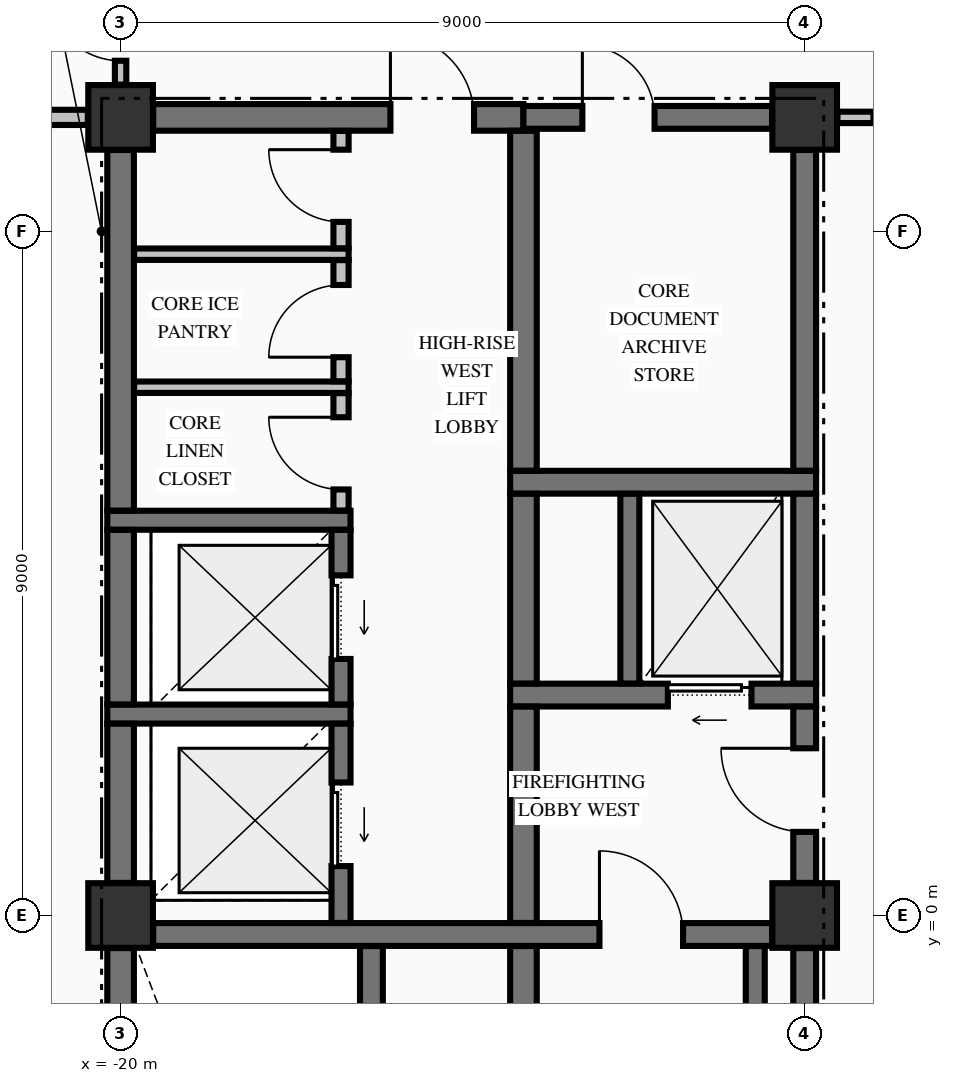
"""IFC4 building model, lengths in metres.
Left out: names, types, materials, properties, quantities, classifications, styles, units other than length and angle.
Written with IfcOpenShell. Run it as: python <this file> out.ifc"""

import sys

from ifc_helpers import new_model, si_unit, direction, frame, frame_2d, origin, origin_2d, place, context, subcontext, project, spatial, rectangle, extrude, element, fill, save


model = new_model("IFC4")
c1 = context("Model", 3, precision=1e-05, world=origin(), true_north=direction((0.0, 1.0)))
c2 = subcontext(c1, "Body", "Model", "MODEL_VIEW")
j1 = project(units=[si_unit("LENGTHUNIT", "METRE"), si_unit("PLANEANGLEUNIT", "RADIAN")], contexts=[c1])
p1 = place(None, origin())
s1 = spatial("IfcSite", under=j1, at=p1, CompositionType="ELEMENT")
p2 = place(p1, origin())
s2 = spatial("IfcBuilding", under=s1, at=p2, CompositionType="ELEMENT")
p3 = place(p2, frame((0.0, 0.0, 201.66)))
s3 = spatial("IfcBuildingStorey", under=s2, at=p3, CompositionType="ELEMENT", Elevation=201.66)
for number, where, z_axis, x_axis in (
    (1, (-20.0, 10.5, -0.25), (0.0, 0.0, 1.0), (1.0, 0.0, 0.0)),
    (2, (-11.0, 0.0, -0.25), (0.0, 0.0, 1.0), (1.0, 0.0, 0.0)),
    (3, (-11.0, 10.5, -0.25), (0.0, 0.0, 1.0), (1.0, 0.0, 0.0)),
    (4, (-20.0, 0.0, -0.25), (0.0, 0.0, 1.0), (1.0, 0.0, 0.0)),
):
    element("IfcColumn", number, at=place(p3, frame(where, z_axis=z_axis, x_axis=x_axis)), inside=s3, PredefinedType="COLUMN", context=c2, shape_type="SweptSolid", body=[
        extrude(rectangle(XDim=0.85, YDim=0.85, at=origin_2d()), origin(), (0.0, 0.0, 1.0), 3.4),
    ])
p4 = place(p3, frame((-19.571, -0.25, 0.0), z_axis=(0.0, 0.0, 1.0), x_axis=(1.0, 0.0, 0.0)))
e5 = element("IfcWall", 5, at=p4, inside=s3, PredefinedType="SHEAR", context=c2, shape_type="SweptSolid", body=[
    extrude(rectangle(XDim=8.142, YDim=0.3, at=frame_2d((4.071, 0.0))), origin(), (0.0, 0.0, 1.0), 3.15),
])
p5 = place(p4, frame((5.871, 0.0, 0.0)))
e6 = element("IfcOpeningElement", 6, at=p5, cuts=e5, PredefinedType="OPENING", context=c2, shape_type="SweptSolid", body=[
    extrude(rectangle(XDim=1.1, YDim=2.15, at=frame_2d((0.55, 1.075))), frame((0.0, 0.16, 0.0), z_axis=(0.0, -1.0, 0.0), x_axis=(1.0, 0.0, 0.0)), (0.0, 0.0, 1.0), 0.32),
])
p6 = place(p3, frame((-20.175, 2.65, 0.0), z_axis=(0.0, 0.0, 1.0), x_axis=(1.0, 0.0, 0.0)))
e7 = element("IfcWall", 7, at=p6, inside=s3, PredefinedType="SOLIDWALL", context=c2, shape_type="SweptSolid", body=[
    extrude(rectangle(XDim=3.2, YDim=0.25, at=frame_2d((1.6, 0.0))), origin(), (0.0, 0.0, 1.0), 3.15),
])
p7 = place(p3, frame((-14.875, 2.9, 0.0), z_axis=(0.0, 0.0, 1.0), x_axis=(1.0, 0.0, 0.0)))
e8 = element("IfcWall", 8, at=p7, inside=s3, PredefinedType="SHEAR", context=c2, shape_type="SweptSolid", body=[
    extrude(rectangle(XDim=4.025, YDim=0.3, at=frame_2d((2.012, 0.0))), origin(), (0.0, 0.0, 1.0), 3.15),
])
p8 = place(p7, frame((2.075, 0.0, 0.0)))
e9 = element("IfcOpeningElement", 9, at=p8, cuts=e8, PredefinedType="OPENING", context=c2, shape_type="SweptSolid", body=[
    extrude(rectangle(XDim=1.1, YDim=2.2, at=frame_2d((0.55, 1.1))), frame((0.0, 0.16, 0.0), z_axis=(0.0, -1.0, 0.0), x_axis=(1.0, 0.0, 0.0)), (0.0, 0.0, 1.0), 0.32),
])
p9 = place(p3, frame((-20.175, 5.2, 0.0), z_axis=(0.0, 0.0, 1.0), x_axis=(1.0, 0.0, 0.0)))
e10 = element("IfcWall", 10, at=p9, inside=s3, PredefinedType="SOLIDWALL", context=c2, shape_type="SweptSolid", body=[
    extrude(rectangle(XDim=3.2, YDim=0.25, at=frame_2d((1.6, 0.0))), origin(), (0.0, 0.0, 1.0), 3.15),
])
p10 = place(p3, frame((-14.875, 5.7, 0.0), z_axis=(0.0, 0.0, 1.0), x_axis=(1.0, 0.0, 0.0)))
e11 = element("IfcWall", 11, at=p10, inside=s3, PredefinedType="SHEAR", context=c2, shape_type="SweptSolid", body=[
    extrude(rectangle(XDim=4.025, YDim=0.3, at=frame_2d((2.012, 0.0))), origin(), (0.0, 0.0, 1.0), 3.15),
])
p11 = place(p3, frame((-19.571, 10.5, 0.0), z_axis=(0.0, 0.0, 1.0), x_axis=(1.0, 0.0, 0.0)))
e12 = element("IfcWall", 12, at=p11, inside=s3, PredefinedType="SHEAR", context=c2, shape_type="SweptSolid", body=[
    extrude(rectangle(XDim=4.871, YDim=0.35, at=frame_2d((2.436, 0.0))), origin(), (0.0, 0.0, 1.0), 3.15),
])
p12 = place(p11, frame((3.121, 0.0, 0.0)))
e13 = element("IfcOpeningElement", 13, at=p12, cuts=e12, PredefinedType="OPENING", context=c2, shape_type="SweptSolid", body=[
    extrude(rectangle(XDim=1.1, YDim=2.15, at=frame_2d((0.55, 1.075))), frame((0.0, 0.185, 0.0), z_axis=(0.0, -1.0, 0.0), x_axis=(1.0, 0.0, 0.0)), (0.0, 0.0, 1.0), 0.37),
])
p13 = place(p3, frame((-14.7, 10.5, 0.0), z_axis=(0.0, 0.0, 1.0), x_axis=(1.0, 0.0, 0.0)))
e14 = element("IfcWall", 14, at=p13, inside=s3, PredefinedType="SHEAR", context=c2, shape_type="SweptSolid", body=[
    extrude(rectangle(XDim=3.271, YDim=0.3, at=frame_2d((1.635, 0.0))), origin(), (0.0, 0.0, 1.0), 3.15),
])
p14 = place(p13, frame((0.775, 0.0, 0.0)))
e15 = element("IfcOpeningElement", 15, at=p14, cuts=e14, PredefinedType="OPENING", context=c2, shape_type="SweptSolid", body=[
    extrude(rectangle(XDim=0.95, YDim=2.15, at=frame_2d((0.475, 1.075))), frame((0.0, 0.16, 0.0), z_axis=(0.0, -1.0, 0.0), x_axis=(1.0, 0.0, 0.0)), (0.0, 0.0, 1.0), 0.32),
])
for number, where, z_axis, x_axis in (
    (16, (-19.822, 6.95, 0.0), (0.0, 0.0, 1.0), (1.0, 0.0, 0.0)),
    (17, (-19.822, 8.7, 0.0), (0.0, 0.0, 1.0), (1.0, 0.0, 0.0)),
):
    element("IfcWall", number, at=place(p3, frame(where, z_axis=z_axis, x_axis=x_axis)), inside=s3, PredefinedType="PARTITIONING", context=c2, shape_type="SweptSolid", body=[
        extrude(rectangle(XDim=2.822, YDim=0.15, at=frame_2d((1.411, 0.0))), origin(), (0.0, 0.0, 1.0), 3.15),
    ])
p15 = place(p3, frame((-26.835, 10.5, 0.0), z_axis=(0.0, 0.0, 1.0), x_axis=(1.0, 0.0, 0.0)))
e18 = element("IfcWall", 18, at=p15, inside=s3, PredefinedType="PARTITIONING", context=c2, shape_type="SweptSolid", body=[
    extrude(rectangle(XDim=6.404, YDim=0.2, at=frame_2d((3.202, 0.0))), origin(), (0.0, 0.0, 1.0), 3.15),
])
p16 = place(p15, frame((2.86, 0.0, 0.0)))
e19 = element("IfcOpeningElement", 19, at=p16, cuts=e18, PredefinedType="OPENING", context=c2, shape_type="SweptSolid", body=[
    extrude(rectangle(XDim=0.95, YDim=2.15, at=frame_2d((0.475, 1.075))), frame((0.0, 0.11, 0.0), z_axis=(0.0, -1.0, 0.0), x_axis=(1.0, 0.0, 0.0)), (0.0, 0.0, 1.0), 0.22),
])
p17 = place(p3, frame((-10.569, 10.5, 0.0), z_axis=(0.0, 0.0, 1.0), x_axis=(1.0, 0.0, 0.0)))
e20 = element("IfcWall", 20, at=p17, inside=s3, PredefinedType="PARTITIONING", context=c2, shape_type="SweptSolid", body=[
    extrude(rectangle(XDim=21.138, YDim=0.15, at=frame_2d((10.569, 0.0))), origin(), (0.0, 0.0, 1.0), 3.15),
])
p18 = place(p17, frame((0.474, 0.0, 0.0)))
e21 = element("IfcOpeningElement", 21, at=p18, cuts=e20, PredefinedType="OPENING", context=c2, shape_type="SweptSolid", body=[
    extrude(rectangle(XDim=1.05, YDim=2.15, at=frame_2d((0.525, 1.075))), frame((0.0, 0.085, 0.0), z_axis=(0.0, -1.0, 0.0), x_axis=(1.0, 0.0, 0.0)), (0.0, 0.0, 1.0), 0.17),
])
p19 = place(p17, frame((19.614, 0.0, 0.0)))
e22 = element("IfcOpeningElement", 22, at=p19, cuts=e20, PredefinedType="OPENING", context=c2, shape_type="SweptSolid", body=[
    extrude(rectangle(XDim=1.05, YDim=2.15, at=frame_2d((0.525, 1.075))), frame((0.0, 0.085, 0.0), z_axis=(0.0, -1.0, 0.0), x_axis=(1.0, 0.0, 0.0)), (0.0, 0.0, 1.0), 0.17),
])
p20 = place(p3, frame((-20.0, -9.521, 0.0), z_axis=(0.0, 0.0, 1.0), x_axis=(0.0, 1.0, 0.0)))
e23 = element("IfcWall", 23, at=p20, inside=s3, PredefinedType="SHEAR", context=c2, shape_type="SweptSolid", body=[
    extrude(rectangle(XDim=9.092, YDim=0.35, at=frame_2d((4.546, 0.0))), origin(), (0.0, 0.0, 1.0), 3.15),
])
p21 = place(p3, frame((-20.0, 0.429, 0.0), z_axis=(0.0, 0.0, 1.0), x_axis=(0.0, 1.0, 0.0)))
e24 = element("IfcWall", 24, at=p21, inside=s3, PredefinedType="SHEAR", context=c2, shape_type="SweptSolid", body=[
    extrude(rectangle(XDim=2.094, YDim=0.35, at=frame_2d((1.047, 0.0))), origin(), (0.0, 0.0, 1.0), 3.15),
])
p22 = place(p3, frame((-20.0, 2.777, 0.0), z_axis=(0.0, 0.0, 1.0), x_axis=(0.0, 1.0, 0.0)))
e25 = element("IfcWall", 25, at=p22, inside=s3, PredefinedType="SHEAR", context=c2, shape_type="SweptSolid", body=[
    extrude(rectangle(XDim=2.296, YDim=0.35, at=frame_2d((1.148, 0.0))), origin(), (0.0, 0.0, 1.0), 3.15),
])
p23 = place(p3, frame((-20.0, 5.327, 0.0), z_axis=(0.0, 0.0, 1.0), x_axis=(0.0, 1.0, 0.0)))
e26 = element("IfcWall", 26, at=p23, inside=s3, PredefinedType="SHEAR", context=c2, shape_type="SweptSolid", body=[
    extrude(rectangle(XDim=4.744, YDim=0.35, at=frame_2d((2.372, 0.0))), origin(), (0.0, 0.0, 1.0), 3.15),
])
p24 = place(p3, frame((-17.1, -0.098, 0.0), z_axis=(0.0, 0.0, 1.0), x_axis=(0.0, 1.0, 0.0)))
e27 = element("IfcWall", 27, at=p24, inside=s3, PredefinedType="SOLIDWALL", context=c2, shape_type="SweptSolid", body=[
    extrude(rectangle(XDim=2.621, YDim=0.25, at=frame_2d((1.311, 0.0))), origin(), (0.0, 0.0, 1.0), 3.15),
])
p25 = place(p24, frame((0.748, 0.0, 0.0)))
e28 = element("IfcOpeningElement", 28, at=p25, cuts=e27, PredefinedType="OPENING", context=c2, shape_type="SweptSolid", body=[
    extrude(rectangle(XDim=1.1, YDim=2.2, at=frame_2d((0.55, 1.1))), frame((0.0, 0.135, 0.0), z_axis=(0.0, -1.0, 0.0), x_axis=(1.0, 0.0, 0.0)), (0.0, 0.0, 1.0), 0.27),
])
p26 = place(p3, frame((-17.1, 2.777, 0.0), z_axis=(0.0, 0.0, 1.0), x_axis=(0.0, 1.0, 0.0)))
e29 = element("IfcWall", 29, at=p26, inside=s3, PredefinedType="SOLIDWALL", context=c2, shape_type="SweptSolid", body=[
    extrude(rectangle(XDim=2.296, YDim=0.25, at=frame_2d((1.148, 0.0))), origin(), (0.0, 0.0, 1.0), 3.15),
])
p27 = place(p26, frame((0.598, 0.0, 0.0)))
e30 = element("IfcOpeningElement", 30, at=p27, cuts=e29, PredefinedType="OPENING", context=c2, shape_type="SweptSolid", body=[
    extrude(rectangle(XDim=1.1, YDim=2.2, at=frame_2d((0.55, 1.1))), frame((0.0, 0.135, 0.0), z_axis=(0.0, -1.0, 0.0), x_axis=(1.0, 0.0, 0.0)), (0.0, 0.0, 1.0), 0.27),
])
p28 = place(p3, frame((-16.7, -9.773, 0.0), z_axis=(0.0, 0.0, 1.0), x_axis=(0.0, 1.0, 0.0)))
e31 = element("IfcWall", 31, at=p28, inside=s3, PredefinedType="SHEAR", context=c2, shape_type="SweptSolid", body=[
    extrude(rectangle(XDim=9.371, YDim=0.3, at=frame_2d((4.686, 0.0))), origin(), (0.0, 0.0, 1.0), 3.15),
])
p29 = place(p3, frame((-14.7, -9.773, 0.0), z_axis=(0.0, 0.0, 1.0), x_axis=(0.0, 1.0, 0.0)))
e32 = element("IfcWall", 32, at=p29, inside=s3, PredefinedType="SHEAR", context=c2, shape_type="SweptSolid", body=[
    extrude(rectangle(XDim=9.371, YDim=0.35, at=frame_2d((4.686, 0.0))), origin(), (0.0, 0.0, 1.0), 3.15),
])
p30 = place(p3, frame((-14.7, -0.098, 0.0), z_axis=(0.0, 0.0, 1.0), x_axis=(0.0, 1.0, 0.0)))
e33 = element("IfcWall", 33, at=p30, inside=s3, PredefinedType="SHEAR", context=c2, shape_type="SweptSolid", body=[
    extrude(rectangle(XDim=2.846, YDim=0.35, at=frame_2d((1.423, 0.0))), origin(), (0.0, 0.0, 1.0), 3.15),
])
p31 = place(p3, frame((-14.7, 3.052, 0.0), z_axis=(0.0, 0.0, 1.0), x_axis=(0.0, 1.0, 0.0)))
e34 = element("IfcWall", 34, at=p31, inside=s3, PredefinedType="SHEAR", context=c2, shape_type="SweptSolid", body=[
    extrude(rectangle(XDim=2.496, YDim=0.35, at=frame_2d((1.248, 0.0))), origin(), (0.0, 0.0, 1.0), 3.15),
])
p32 = place(p3, frame((-14.7, 5.852, 0.0), z_axis=(0.0, 0.0, 1.0), x_axis=(0.0, 1.0, 0.0)))
e35 = element("IfcWall", 35, at=p32, inside=s3, PredefinedType="SHEAR", context=c2, shape_type="SweptSolid", body=[
    extrude(rectangle(XDim=4.471, YDim=0.35, at=frame_2d((2.235, 0.0))), origin(), (0.0, 0.0, 1.0), 3.15),
])
p33 = place(p3, frame((-13.3, 3.052, 0.0), z_axis=(0.0, 0.0, 1.0), x_axis=(0.0, 1.0, 0.0)))
e36 = element("IfcWall", 36, at=p33, inside=s3, PredefinedType="SOLIDWALL", context=c2, shape_type="SweptSolid", body=[
    extrude(rectangle(XDim=2.496, YDim=0.25, at=frame_2d((1.248, 0.0))), origin(), (0.0, 0.0, 1.0), 3.15),
])
p34 = place(p3, frame((-11.65, -9.798, 0.0), z_axis=(0.0, 0.0, 1.0), x_axis=(0.0, 1.0, 0.0)))
e37 = element("IfcWall", 37, at=p34, inside=s3, PredefinedType="SOLIDWALL", context=c2, shape_type="SweptSolid", body=[
    extrude(rectangle(XDim=9.396, YDim=0.25, at=frame_2d((4.698, 0.0))), origin(), (0.0, 0.0, 1.0), 3.15),
])
p35 = place(p3, frame((-11.0, -9.521, 0.0), z_axis=(0.0, 0.0, 1.0), x_axis=(0.0, 1.0, 0.0)))
e38 = element("IfcWall", 38, at=p35, inside=s3, PredefinedType="SHEAR", context=c2, shape_type="SweptSolid", body=[
    extrude(rectangle(XDim=9.092, YDim=0.3, at=frame_2d((4.546, 0.0))), origin(), (0.0, 0.0, 1.0), 3.15),
])
p36 = place(p3, frame((-11.0, 0.429, 0.0), z_axis=(0.0, 0.0, 1.0), x_axis=(0.0, 1.0, 0.0)))
e39 = element("IfcWall", 39, at=p36, inside=s3, PredefinedType="SHEAR", context=c2, shape_type="SweptSolid", body=[
    extrude(rectangle(XDim=2.319, YDim=0.3, at=frame_2d((1.16, 0.0))), origin(), (0.0, 0.0, 1.0), 3.15),
])
p37 = place(p36, frame((0.671, 0.0, 0.0)))
e40 = element("IfcOpeningElement", 40, at=p37, cuts=e39, PredefinedType="OPENING", context=c2, shape_type="SweptSolid", body=[
    extrude(rectangle(XDim=1.1, YDim=2.15, at=frame_2d((0.55, 1.075))), frame((0.0, 0.16, 0.0), z_axis=(0.0, -1.0, 0.0), x_axis=(1.0, 0.0, 0.0)), (0.0, 0.0, 1.0), 0.32),
])
p38 = place(p3, frame((-11.0, 3.052, 0.0), z_axis=(0.0, 0.0, 1.0), x_axis=(0.0, 1.0, 0.0)))
e41 = element("IfcWall", 41, at=p38, inside=s3, PredefinedType="SHEAR", context=c2, shape_type="SweptSolid", body=[
    extrude(rectangle(XDim=2.496, YDim=0.3, at=frame_2d((1.248, 0.0))), origin(), (0.0, 0.0, 1.0), 3.15),
])
p39 = place(p3, frame((-11.0, 5.852, 0.0), z_axis=(0.0, 0.0, 1.0), x_axis=(0.0, 1.0, 0.0)))
e42 = element("IfcWall", 42, at=p39, inside=s3, PredefinedType="SHEAR", context=c2, shape_type="SweptSolid", body=[
    extrude(rectangle(XDim=4.219, YDim=0.3, at=frame_2d((2.109, 0.0))), origin(), (0.0, 0.0, 1.0), 3.15),
])
p40 = place(p3, frame((-20.0, 10.931, 0.0), z_axis=(0.0, 0.0, 1.0), x_axis=(0.0, 1.0, 0.0)))
e43 = element("IfcWall", 43, at=p40, inside=s3, PredefinedType="PARTITIONING", context=c2, shape_type="SweptSolid", body=[
    extrude(rectangle(XDim=1.916, YDim=0.15, at=frame_2d((0.958, 0.0))), origin(), (0.0, 0.0, 1.0), 2.342),
])
p41 = place(p40, frame((0.314, 0.0, 0.0)))
e44 = element("IfcOpeningElement", 44, at=p41, cuts=e43, PredefinedType="OPENING", context=c2, shape_type="SweptSolid", body=[
    extrude(rectangle(XDim=0.95, YDim=2.15, at=frame_2d((0.475, 1.075))), frame((0.0, 0.085, 0.0), z_axis=(0.0, -1.0, 0.0), x_axis=(1.0, 0.0, 0.0)), (0.0, 0.0, 1.0), 0.17),
])
p42 = place(p3, frame((-17.1, 5.328, 0.0), z_axis=(0.0, 0.0, 1.0), x_axis=(0.0, 1.0, 0.0)))
e45 = element("IfcWall", 45, at=p42, inside=s3, PredefinedType="PARTITIONING", context=c2, shape_type="SweptSolid", body=[
    extrude(rectangle(XDim=1.544, YDim=0.2, at=frame_2d((0.772, 0.0))), origin(), (0.0, 0.0, 1.0), 3.15),
])
p43 = place(p42, frame((0.277, 0.0, 0.0)))
e46 = element("IfcOpeningElement", 46, at=p43, cuts=e45, PredefinedType="OPENING", context=c2, shape_type="SweptSolid", body=[
    extrude(rectangle(XDim=0.95, YDim=2.15, at=frame_2d((0.475, 1.075))), frame((0.0, 0.11, 0.0), z_axis=(0.0, -1.0, 0.0), x_axis=(1.0, 0.0, 0.0)), (0.0, 0.0, 1.0), 0.22),
])
p44 = place(p3, frame((-17.1, 7.028, 0.0), z_axis=(0.0, 0.0, 1.0), x_axis=(0.0, 1.0, 0.0)))
e47 = element("IfcWall", 47, at=p44, inside=s3, PredefinedType="PARTITIONING", context=c2, shape_type="SweptSolid", body=[
    extrude(rectangle(XDim=1.594, YDim=0.2, at=frame_2d((0.797, 0.0))), origin(), (0.0, 0.0, 1.0), 3.15),
])
p45 = place(p44, frame((0.317, 0.0, 0.0)))
e48 = element("IfcOpeningElement", 48, at=p45, cuts=e47, PredefinedType="OPENING", context=c2, shape_type="SweptSolid", body=[
    extrude(rectangle(XDim=0.95, YDim=2.15, at=frame_2d((0.475, 1.075))), frame((0.0, 0.11, 0.0), z_axis=(0.0, -1.0, 0.0), x_axis=(1.0, 0.0, 0.0)), (0.0, 0.0, 1.0), 0.22),
])
p46 = place(p3, frame((-17.1, 8.778, 0.0), z_axis=(0.0, 0.0, 1.0), x_axis=(0.0, 1.0, 0.0)))
e49 = element("IfcWall", 49, at=p46, inside=s3, PredefinedType="PARTITIONING", context=c2, shape_type="SweptSolid", body=[
    extrude(rectangle(XDim=1.544, YDim=0.2, at=frame_2d((0.772, 0.0))), origin(), (0.0, 0.0, 1.0), 3.15),
])
p47 = place(p46, frame((0.347, 0.0, 0.0)))
e50 = element("IfcOpeningElement", 50, at=p47, cuts=e49, PredefinedType="OPENING", context=c2, shape_type="SweptSolid", body=[
    extrude(rectangle(XDim=0.95, YDim=2.15, at=frame_2d((0.475, 1.075))), frame((0.0, 0.11, 0.0), z_axis=(0.0, -1.0, 0.0), x_axis=(1.0, 0.0, 0.0)), (0.0, 0.0, 1.0), 0.22),
])
p48 = place(p5, origin())
e51 = element("IfcDoor", 51, at=p48, inside=s3, OperationType="SINGLE_SWING_LEFT", PredefinedType="DOOR", context=c2, shape_type="SweptSolid", body=[
    extrude(rectangle(XDim=1.1, YDim=2.15, at=frame_2d((0.55, 1.075))), frame((0.0, 0.025, 0.0), z_axis=(0.0, -1.0, 0.0), x_axis=(1.0, 0.0, 0.0)), (0.0, 0.0, 1.0), 0.05),
])
fill(e6, e51)
p49 = place(p37, origin())
e52 = element("IfcDoor", 52, at=p49, inside=s3, OperationType="SINGLE_SWING_RIGHT", PredefinedType="DOOR", context=c2, shape_type="SweptSolid", body=[
    extrude(rectangle(XDim=1.1, YDim=2.15, at=frame_2d((0.55, 1.075))), frame((0.0, 0.025, 0.0), z_axis=(0.0, -1.0, 0.0), x_axis=(1.0, 0.0, 0.0)), (0.0, 0.0, 1.0), 0.05),
])
fill(e40, e52)
p50 = place(p8, origin())
e53 = element("IfcDoor", 53, at=p50, inside=s3, OperationType="SLIDING_TO_LEFT", PredefinedType="DOOR", context=c2, shape_type="SweptSolid", body=[
    extrude(rectangle(XDim=1.1, YDim=2.2, at=frame_2d((0.55, 1.1))), frame((0.0, 0.025, 0.0), z_axis=(0.0, -1.0, 0.0), x_axis=(1.0, 0.0, 0.0)), (0.0, 0.0, 1.0), 0.05),
])
fill(e9, e53)
p51 = place(p14, origin())
e54 = element("IfcDoor", 54, at=p51, inside=s3, OperationType="SINGLE_SWING_LEFT", PredefinedType="DOOR", context=c2, shape_type="SweptSolid", body=[
    extrude(rectangle(XDim=0.95, YDim=2.15, at=frame_2d((0.475, 1.075))), frame((0.0, 0.025, 0.0), z_axis=(0.0, -1.0, 0.0), x_axis=(1.0, 0.0, 0.0)), (0.0, 0.0, 1.0), 0.05),
])
fill(e15, e54)
p52 = place(p25, origin())
e55 = element("IfcDoor", 55, at=p52, inside=s3, OperationType="SLIDING_TO_LEFT", PredefinedType="DOOR", context=c2, shape_type="SweptSolid", body=[
    extrude(rectangle(XDim=1.1, YDim=2.2, at=frame_2d((0.55, 1.1))), frame((0.0, 0.025, 0.0), z_axis=(0.0, -1.0, 0.0), x_axis=(1.0, 0.0, 0.0)), (0.0, 0.0, 1.0), 0.05),
])
fill(e28, e55)
p53 = place(p27, origin())
e56 = element("IfcDoor", 56, at=p53, inside=s3, OperationType="SLIDING_TO_LEFT", PredefinedType="DOOR", context=c2, shape_type="SweptSolid", body=[
    extrude(rectangle(XDim=1.1, YDim=2.2, at=frame_2d((0.55, 1.1))), frame((0.0, 0.025, 0.0), z_axis=(0.0, -1.0, 0.0), x_axis=(1.0, 0.0, 0.0)), (0.0, 0.0, 1.0), 0.05),
])
fill(e30, e56)
p54 = place(p12, origin())
e57 = element("IfcDoor", 57, at=p54, inside=s3, OperationType="SINGLE_SWING_LEFT", PredefinedType="DOOR", context=c2, shape_type="SweptSolid", body=[
    extrude(rectangle(XDim=1.1, YDim=2.15, at=frame_2d((0.55, 1.075))), frame((0.0, 0.025, 0.0), z_axis=(0.0, -1.0, 0.0), x_axis=(1.0, 0.0, 0.0)), (0.0, 0.0, 1.0), 0.05),
])
fill(e13, e57)
p55 = place(p47, origin())
e58 = element("IfcDoor", 58, at=p55, inside=s3, OperationType="SINGLE_SWING_RIGHT", PredefinedType="DOOR", context=c2, shape_type="SweptSolid", body=[
    extrude(rectangle(XDim=0.95, YDim=2.15, at=frame_2d((0.475, 1.075))), frame((0.0, 0.025, 0.0), z_axis=(0.0, -1.0, 0.0), x_axis=(1.0, 0.0, 0.0)), (0.0, 0.0, 1.0), 0.05),
])
fill(e50, e58)
p56 = place(p45, origin())
e59 = element("IfcDoor", 59, at=p56, inside=s3, OperationType="SINGLE_SWING_LEFT", PredefinedType="DOOR", context=c2, shape_type="SweptSolid", body=[
    extrude(rectangle(XDim=0.95, YDim=2.15, at=frame_2d((0.475, 1.075))), frame((0.0, 0.025, 0.0), z_axis=(0.0, -1.0, 0.0), x_axis=(1.0, 0.0, 0.0)), (0.0, 0.0, 1.0), 0.05),
])
fill(e48, e59)
p57 = place(p43, origin())
e60 = element("IfcDoor", 60, at=p57, inside=s3, OperationType="SINGLE_SWING_RIGHT", PredefinedType="DOOR", context=c2, shape_type="SweptSolid", body=[
    extrude(rectangle(XDim=0.95, YDim=2.15, at=frame_2d((0.475, 1.075))), frame((0.0, 0.025, 0.0), z_axis=(0.0, -1.0, 0.0), x_axis=(1.0, 0.0, 0.0)), (0.0, 0.0, 1.0), 0.05),
])
fill(e46, e60)
p58 = place(p41, origin())
e61 = element("IfcDoor", 61, at=p58, inside=s3, OperationType="SINGLE_SWING_RIGHT", PredefinedType="DOOR", context=c2, shape_type="SweptSolid", body=[
    extrude(rectangle(XDim=0.95, YDim=2.15, at=frame_2d((0.475, 1.075))), frame((0.0, 0.025, 0.0), z_axis=(0.0, -1.0, 0.0), x_axis=(1.0, 0.0, 0.0)), (0.0, 0.0, 1.0), 0.05),
])
fill(e44, e61)
save(model, sys.argv[1])
